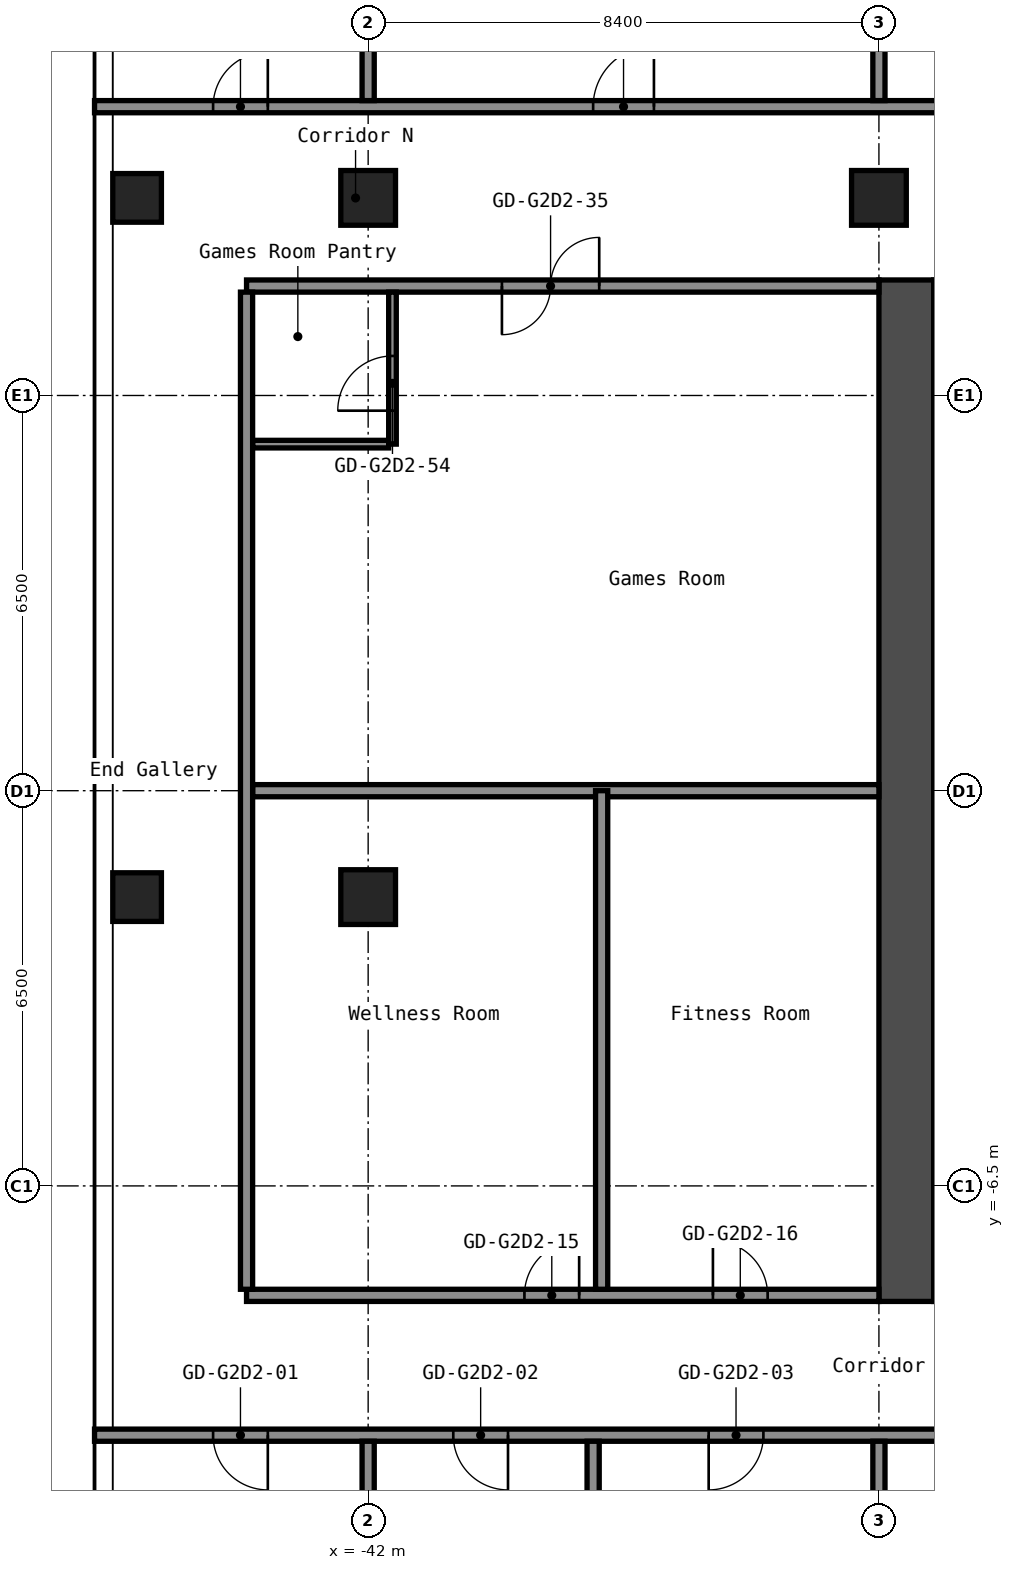
"""IFC4 building model, lengths in metres.
Left out: names, types, materials, properties, quantities, classifications, styles, units other than length and angle.
Written with IfcOpenShell. Run it as: python <this file> out.ifc"""

import sys

from ifc_helpers import new_model, si_unit, direction, frame, frame_2d, origin, origin_2d, place, context, subcontext, project, spatial, rectangle, hollow_rectangle, extrude, element, fill, save


model = new_model("IFC4")
c1 = context("Model", 3, precision=1e-05, world=origin(), true_north=direction((0.0, 1.0)))
c2 = subcontext(c1, "Body", "Model", "MODEL_VIEW")
j1 = project(units=[si_unit("LENGTHUNIT", "METRE"), si_unit("PLANEANGLEUNIT", "RADIAN")], contexts=[c1])
p1 = place(None, origin())
s1 = spatial("IfcSite", under=j1, at=p1, CompositionType="ELEMENT")
p2 = place(p1, origin())
s2 = spatial("IfcBuilding", under=s1, at=p2, CompositionType="ELEMENT")
p3 = place(p2, frame((0.0, 0.0, 117.0)))
s3 = spatial("IfcBuildingStorey", under=s2, at=p3, CompositionType="ELEMENT", Elevation=117.0)
for number, where, z_axis, x_axis in (
    (1, (-45.8, -1.75, 0.0), (0.0, 0.0, 1.0), (1.0, 0.0, 0.0)),
    (2, (-45.8, 9.75, 0.0), (0.0, 0.0, 1.0), (1.0, 0.0, 0.0)),
):
    element("IfcColumn", number, at=place(p3, frame(where, z_axis=z_axis, x_axis=x_axis)), inside=s3, PredefinedType="COLUMN", context=c2, shape_type="SweptSolid", body=[
        extrude(hollow_rectangle(XDim=0.8, YDim=0.8, WallThickness=0.032, at=origin_2d()), origin(), (0.0, 0.0, 1.0), 2.9),
    ])
for number, where, z_axis, x_axis in (
    (3, (-42.0, -1.75, 0.0), (0.0, 0.0, 1.0), (1.0, 0.0, 0.0)),
    (4, (-42.0, 9.75, 0.0), (0.0, 0.0, 1.0), (1.0, 0.0, 0.0)),
    (5, (-33.6, 9.75, 0.0), (0.0, 0.0, 1.0), (1.0, 0.0, 0.0)),
):
    element("IfcColumn", number, at=place(p3, frame(where, z_axis=z_axis, x_axis=x_axis)), inside=s3, PredefinedType="COLUMN", context=c2, shape_type="SweptSolid", body=[
        extrude(hollow_rectangle(XDim=0.9, YDim=0.9, WallThickness=0.036, at=origin_2d()), origin(), (0.0, 0.0, 1.0), 2.9),
    ])
p4 = place(p3, frame((-33.15, -8.4, 0.0), z_axis=(0.0, 0.0, 1.0), x_axis=(0.0, 1.0, 0.0)))
e6 = element("IfcWall", 6, at=p4, inside=s3, PredefinedType="SHEAR", context=c2, shape_type="SweptSolid", body=[
    extrude(rectangle(XDim=16.8, YDim=0.9, at=frame_2d((8.4, 0.0))), origin(), (0.0, 0.0, 1.0), 2.9),
])
p5 = place(p3, frame((-32.7, 7.95, 0.0), z_axis=(0.0, 0.0, 1.0), x_axis=(1.0, 0.0, 0.0)))
e7 = element("IfcWall", 7, at=p5, inside=s3, PredefinedType="SHEAR", context=c2, shape_type="SweptSolid", body=[
    extrude(rectangle(XDim=15.0, YDim=0.9, at=frame_2d((7.5, 0.0))), origin(), (0.0, 0.0, 1.0), 2.9),
])
p6 = place(p5, frame((3.4, 0.0, 0.0)))
e8 = element("IfcOpeningElement", 8, at=p6, cuts=e7, PredefinedType="OPENING", context=c2, shape_type="SweptSolid", body=[
    extrude(rectangle(XDim=1.2, YDim=2.1, at=frame_2d((0.6, 1.05))), frame((0.0, 0.46, 0.0), z_axis=(0.0, -1.0, 0.0), x_axis=(1.0, 0.0, 0.0)), (0.0, 0.0, 1.0), 0.92),
])
p7 = place(p5, frame((0.75, 0.0, 0.0)))
e9 = element("IfcOpeningElement", 9, at=p7, cuts=e7, PredefinedType="OPENING", context=c2, shape_type="SweptSolid", body=[
    extrude(rectangle(XDim=0.9, YDim=2.1, at=frame_2d((0.45, 1.05))), frame((0.0, 0.46, 0.0), z_axis=(0.0, -1.0, 0.0), x_axis=(1.0, 0.0, 0.0)), (0.0, 0.0, 1.0), 0.92),
])
p8 = place(p3, frame((-32.7, -7.95, 0.0), z_axis=(0.0, 0.0, 1.0), x_axis=(1.0, 0.0, 0.0)))
e10 = element("IfcWall", 10, at=p8, inside=s3, PredefinedType="SHEAR", context=c2, shape_type="SweptSolid", body=[
    extrude(rectangle(XDim=15.0, YDim=0.9, at=frame_2d((7.5, 0.0))), origin(), (0.0, 0.0, 1.0), 2.9),
])
p9 = place(p8, frame((11.45, 0.0, 0.0)))
e11 = element("IfcOpeningElement", 11, at=p9, cuts=e10, PredefinedType="OPENING", context=c2, shape_type="SweptSolid", body=[
    extrude(rectangle(XDim=1.0, YDim=2.1, at=frame_2d((0.5, 1.05))), frame((0.0, 0.46, 0.0), z_axis=(0.0, -1.0, 0.0), x_axis=(1.0, 0.0, 0.0)), (0.0, 0.0, 1.0), 0.92),
])
p10 = place(p3, frame((-32.7, 1.325, 0.0), z_axis=(0.0, 0.0, 1.0), x_axis=(1.0, 0.0, 0.0)))
e12 = element("IfcWall", 12, at=p10, inside=s3, PredefinedType="SHEAR", context=c2, shape_type="SweptSolid", body=[
    extrude(rectangle(XDim=5.05, YDim=0.25, at=frame_2d((2.525, 0.0))), origin(), (0.0, 0.0, 1.0), 2.9),
])
p11 = place(p10, frame((3.3, 0.0, 0.0)))
e13 = element("IfcOpeningElement", 13, at=p11, cuts=e12, PredefinedType="OPENING", context=c2, shape_type="SweptSolid", body=[
    extrude(rectangle(XDim=1.2, YDim=2.1, at=frame_2d((0.6, 1.05))), frame((0.0, 0.135, 0.0), z_axis=(0.0, -1.0, 0.0), x_axis=(1.0, 0.0, 0.0)), (0.0, 0.0, 1.0), 0.27),
])
p12 = place(p3, frame((-32.7, 2.375, 0.0), z_axis=(0.0, 0.0, 1.0), x_axis=(1.0, 0.0, 0.0)))
e14 = element("IfcWall", 14, at=p12, inside=s3, PredefinedType="SHEAR", context=c2, shape_type="SweptSolid", body=[
    extrude(rectangle(XDim=2.4, YDim=1.85, at=frame_2d((1.2, 0.0))), origin(), (0.0, 0.0, 1.0), 2.9),
])
p13 = place(p3, frame((-32.7, 6.075, 0.0), z_axis=(0.0, 0.0, 1.0), x_axis=(1.0, 0.0, 0.0)))
e15 = element("IfcWall", 15, at=p13, inside=s3, PredefinedType="SHEAR", context=c2, shape_type="SweptSolid", body=[
    extrude(rectangle(XDim=2.4, YDim=0.25, at=frame_2d((1.2, 0.0))), origin(), (0.0, 0.0, 1.0), 2.9),
])
p14 = place(p3, frame((-32.7, -3.625, 0.0), z_axis=(0.0, 0.0, 1.0), x_axis=(1.0, 0.0, 0.0)))
e16 = element("IfcWall", 16, at=p14, inside=s3, PredefinedType="SHEAR", context=c2, shape_type="SweptSolid", body=[
    extrude(rectangle(XDim=4.55, YDim=0.25, at=frame_2d((2.275, 0.0))), origin(), (0.0, 0.0, 1.0), 2.9),
])
p15 = place(p14, frame((2.85, 0.0, 0.0)))
e17 = element("IfcOpeningElement", 17, at=p15, cuts=e16, PredefinedType="OPENING", context=c2, shape_type="SweptSolid", body=[
    extrude(rectangle(XDim=1.1, YDim=2.1, at=frame_2d((0.55, 1.05))), frame((0.0, 0.135, 0.0), z_axis=(0.0, -1.0, 0.0), x_axis=(1.0, 0.0, 0.0)), (0.0, 0.0, 1.0), 0.27),
])
p16 = place(p14, frame((0.6, 0.0, 0.0)))
e18 = element("IfcOpeningElement", 18, at=p16, cuts=e16, PredefinedType="OPENING", context=c2, shape_type="SweptSolid", body=[
    extrude(rectangle(XDim=1.1, YDim=2.1, at=frame_2d((0.55, 1.05))), frame((0.0, 0.135, 0.0), z_axis=(0.0, -1.0, 0.0), x_axis=(1.0, 0.0, 0.0)), (0.0, 0.0, 1.0), 0.27),
])
p17 = place(p3, frame((-32.7, -6.75, 0.0), z_axis=(0.0, 0.0, 1.0), x_axis=(1.0, 0.0, 0.0)))
e19 = element("IfcWall", 19, at=p17, inside=s3, PredefinedType="SHEAR", context=c2, shape_type="SweptSolid", body=[
    extrude(rectangle(XDim=4.55, YDim=1.5, at=frame_2d((2.275, 0.0))), origin(), (0.0, 0.0, 1.0), 2.9),
])
p18 = place(p3, frame((-32.7, -0.875, 0.0), z_axis=(0.0, 0.0, 1.0), x_axis=(1.0, 0.0, 0.0)))
e20 = element("IfcWall", 20, at=p18, inside=s3, PredefinedType="PARTITIONING", context=c2, shape_type="SweptSolid", body=[
    extrude(rectangle(XDim=2.3, YDim=0.15, at=frame_2d((1.15, 0.0))), origin(), (0.0, 0.0, 1.0), 2.9),
])
p19 = place(p3, frame((-46.5, -10.6, 0.0), z_axis=(0.0, 0.0, 1.0), x_axis=(1.0, 0.0, 0.0)))
e21 = element("IfcWall", 21, at=p19, inside=s3, PredefinedType="PARTITIONING", context=c2, shape_type="SweptSolid", body=[
    extrude(rectangle(XDim=29.7, YDim=0.2, at=frame_2d((14.85, 0.0))), origin(), (0.0, 0.0, 1.0), 2.9),
])
p20 = place(p19, frame((1.95, 0.0, 0.0)))
e22 = element("IfcOpeningElement", 22, at=p20, cuts=e21, PredefinedType="OPENING", context=c2, shape_type="SweptSolid", body=[
    extrude(rectangle(XDim=0.9, YDim=2.1, at=frame_2d((0.45, 1.05))), frame((0.0, 0.11, 0.0), z_axis=(0.0, -1.0, 0.0), x_axis=(1.0, 0.0, 0.0)), (0.0, 0.0, 1.0), 0.22),
])
p21 = place(p19, frame((5.9, 0.0, 0.0)))
e23 = element("IfcOpeningElement", 23, at=p21, cuts=e21, PredefinedType="OPENING", context=c2, shape_type="SweptSolid", body=[
    extrude(rectangle(XDim=0.9, YDim=2.1, at=frame_2d((0.45, 1.05))), frame((0.0, 0.11, 0.0), z_axis=(0.0, -1.0, 0.0), x_axis=(1.0, 0.0, 0.0)), (0.0, 0.0, 1.0), 0.22),
])
p22 = place(p19, frame((10.1, 0.0, 0.0)))
e24 = element("IfcOpeningElement", 24, at=p22, cuts=e21, PredefinedType="OPENING", context=c2, shape_type="SweptSolid", body=[
    extrude(rectangle(XDim=0.9, YDim=2.1, at=frame_2d((0.45, 1.05))), frame((0.0, 0.11, 0.0), z_axis=(0.0, -1.0, 0.0), x_axis=(1.0, 0.0, 0.0)), (0.0, 0.0, 1.0), 0.22),
])
p23 = place(p19, frame((14.885, 0.0, 0.0)))
e25 = element("IfcOpeningElement", 25, at=p23, cuts=e21, PredefinedType="OPENING", context=c2, shape_type="SweptSolid", body=[
    extrude(rectangle(XDim=0.9, YDim=2.1, at=frame_2d((0.45, 1.05))), frame((0.0, 0.11, 0.0), z_axis=(0.0, -1.0, 0.0), x_axis=(1.0, 0.0, 0.0)), (0.0, 0.0, 1.0), 0.22),
])
p24 = place(p19, frame((19.085, 0.0, 0.0)))
e26 = element("IfcOpeningElement", 26, at=p24, cuts=e21, PredefinedType="OPENING", context=c2, shape_type="SweptSolid", body=[
    extrude(rectangle(XDim=0.9, YDim=2.1, at=frame_2d((0.45, 1.05))), frame((0.0, 0.11, 0.0), z_axis=(0.0, -1.0, 0.0), x_axis=(1.0, 0.0, 0.0)), (0.0, 0.0, 1.0), 0.22),
])
p25 = place(p19, frame((22.36, 0.0, 0.0)))
e27 = element("IfcOpeningElement", 27, at=p25, cuts=e21, PredefinedType="OPENING", context=c2, shape_type="SweptSolid", body=[
    extrude(rectangle(XDim=0.9, YDim=2.1, at=frame_2d((0.45, 1.05))), frame((0.0, 0.11, 0.0), z_axis=(0.0, -1.0, 0.0), x_axis=(1.0, 0.0, 0.0)), (0.0, 0.0, 1.0), 0.22),
])
p26 = place(p19, frame((26.56, 0.0, 0.0)))
e28 = element("IfcOpeningElement", 28, at=p26, cuts=e21, PredefinedType="OPENING", context=c2, shape_type="SweptSolid", body=[
    extrude(rectangle(XDim=0.9, YDim=2.1, at=frame_2d((0.45, 1.05))), frame((0.0, 0.11, 0.0), z_axis=(0.0, -1.0, 0.0), x_axis=(1.0, 0.0, 0.0)), (0.0, 0.0, 1.0), 0.22),
])
p27 = place(p3, frame((-44.0, -8.3, 0.0), z_axis=(0.0, 0.0, 1.0), x_axis=(1.0, 0.0, 0.0)))
e29 = element("IfcWall", 29, at=p27, inside=s3, PredefinedType="PARTITIONING", context=c2, shape_type="SweptSolid", body=[
    extrude(rectangle(XDim=10.4, YDim=0.2, at=frame_2d((5.2, 0.0))), origin(), (0.0, 0.0, 1.0), 2.9),
])
p28 = place(p27, frame((4.57, 0.0, 0.0)))
e30 = element("IfcOpeningElement", 30, at=p28, cuts=e29, PredefinedType="OPENING", context=c2, shape_type="SweptSolid", body=[
    extrude(rectangle(XDim=0.9, YDim=2.1, at=frame_2d((0.45, 1.05))), frame((0.0, 0.11, 0.0), z_axis=(0.0, -1.0, 0.0), x_axis=(1.0, 0.0, 0.0)), (0.0, 0.0, 1.0), 0.22),
])
p29 = place(p27, frame((7.67, 0.0, 0.0)))
e31 = element("IfcOpeningElement", 31, at=p29, cuts=e29, PredefinedType="OPENING", context=c2, shape_type="SweptSolid", body=[
    extrude(rectangle(XDim=0.9, YDim=2.1, at=frame_2d((0.45, 1.05))), frame((0.0, 0.11, 0.0), z_axis=(0.0, -1.0, 0.0), x_axis=(1.0, 0.0, 0.0)), (0.0, 0.0, 1.0), 0.22),
])
p30 = place(p3, frame((-43.9, 0.0, 0.0), z_axis=(0.0, 0.0, 1.0), x_axis=(1.0, 0.0, 0.0)))
e32 = element("IfcWall", 32, at=p30, inside=s3, PredefinedType="PARTITIONING", context=c2, shape_type="SweptSolid", body=[
    extrude(rectangle(XDim=10.3, YDim=0.2, at=frame_2d((5.15, 0.0))), origin(), (0.0, 0.0, 1.0), 2.9),
])
p31 = place(p3, frame((-43.9, 5.7, 0.0), z_axis=(0.0, 0.0, 1.0), x_axis=(1.0, 0.0, 0.0)))
e33 = element("IfcWall", 33, at=p31, inside=s3, PredefinedType="PARTITIONING", context=c2, shape_type="SweptSolid", body=[
    extrude(rectangle(XDim=2.237, YDim=0.125, at=frame_2d((1.119, 0.0))), origin(), (0.0, 0.0, 1.0), 2.9),
])
p32 = place(p3, frame((-44.0, 8.3, 0.0), z_axis=(0.0, 0.0, 1.0), x_axis=(1.0, 0.0, 0.0)))
e34 = element("IfcWall", 34, at=p32, inside=s3, PredefinedType="PARTITIONING", context=c2, shape_type="SweptSolid", body=[
    extrude(rectangle(XDim=10.4, YDim=0.2, at=frame_2d((5.2, 0.0))), origin(), (0.0, 0.0, 1.0), 2.9),
])
p33 = place(p32, frame((4.2, 0.0, 0.0)))
e35 = element("IfcOpeningElement", 35, at=p33, cuts=e34, PredefinedType="OPENING", context=c2, shape_type="SweptSolid", body=[
    extrude(rectangle(XDim=1.6, YDim=2.1, at=frame_2d((0.8, 1.05))), frame((0.0, 0.11, 0.0), z_axis=(0.0, -1.0, 0.0), x_axis=(1.0, 0.0, 0.0)), (0.0, 0.0, 1.0), 0.22),
])
p34 = place(p3, frame((-46.5, 11.25, 0.0), z_axis=(0.0, 0.0, 1.0), x_axis=(1.0, 0.0, 0.0)))
e36 = element("IfcWall", 36, at=p34, inside=s3, PredefinedType="PARTITIONING", context=c2, shape_type="SweptSolid", body=[
    extrude(rectangle(XDim=29.7, YDim=0.2, at=frame_2d((14.85, 0.0))), origin(), (0.0, 0.0, 1.0), 2.9),
])
p35 = place(p34, frame((1.95, 0.0, 0.0)))
e37 = element("IfcOpeningElement", 37, at=p35, cuts=e36, PredefinedType="OPENING", context=c2, shape_type="SweptSolid", body=[
    extrude(rectangle(XDim=0.9, YDim=2.1, at=frame_2d((0.45, 1.05))), frame((0.0, 0.11, 0.0), z_axis=(0.0, -1.0, 0.0), x_axis=(1.0, 0.0, 0.0)), (0.0, 0.0, 1.0), 0.22),
])
p36 = place(p34, frame((8.2, 0.0, 0.0)))
e38 = element("IfcOpeningElement", 38, at=p36, cuts=e36, PredefinedType="OPENING", context=c2, shape_type="SweptSolid", body=[
    extrude(rectangle(XDim=1.0, YDim=2.1, at=frame_2d((0.5, 1.05))), frame((0.0, 0.11, 0.0), z_axis=(0.0, -1.0, 0.0), x_axis=(1.0, 0.0, 0.0)), (0.0, 0.0, 1.0), 0.22),
])
p37 = place(p34, frame((16.6, 0.0, 0.0)))
e39 = element("IfcOpeningElement", 39, at=p37, cuts=e36, PredefinedType="OPENING", context=c2, shape_type="SweptSolid", body=[
    extrude(rectangle(XDim=1.0, YDim=2.1, at=frame_2d((0.5, 1.05))), frame((0.0, 0.11, 0.0), z_axis=(0.0, -1.0, 0.0), x_axis=(1.0, 0.0, 0.0)), (0.0, 0.0, 1.0), 0.22),
])
p38 = place(p34, frame((23.54, 0.0, 0.0)))
e40 = element("IfcOpeningElement", 40, at=p38, cuts=e36, PredefinedType="OPENING", context=c2, shape_type="SweptSolid", body=[
    extrude(rectangle(XDim=0.9, YDim=2.1, at=frame_2d((0.45, 1.05))), frame((0.0, 0.11, 0.0), z_axis=(0.0, -1.0, 0.0), x_axis=(1.0, 0.0, 0.0)), (0.0, 0.0, 1.0), 0.22),
])
p39 = place(p34, frame((27.74, 0.0, 0.0)))
e41 = element("IfcOpeningElement", 41, at=p39, cuts=e36, PredefinedType="OPENING", context=c2, shape_type="SweptSolid", body=[
    extrude(rectangle(XDim=0.9, YDim=2.1, at=frame_2d((0.45, 1.05))), frame((0.0, 0.11, 0.0), z_axis=(0.0, -1.0, 0.0), x_axis=(1.0, 0.0, 0.0)), (0.0, 0.0, 1.0), 0.22),
])
p40 = place(p3, frame((-44.0, -8.2, 0.0), z_axis=(0.0, 0.0, 1.0), x_axis=(0.0, 1.0, 0.0)))
e42 = element("IfcWall", 42, at=p40, inside=s3, PredefinedType="PARTITIONING", context=c2, shape_type="SweptSolid", body=[
    extrude(rectangle(XDim=16.4, YDim=0.2, at=frame_2d((8.2, 0.0))), origin(), (0.0, 0.0, 1.0), 2.9),
])
p41 = place(p3, frame((-42.0, -15.55, 0.0), z_axis=(0.0, 0.0, 1.0), x_axis=(0.0, 1.0, 0.0)))
e43 = element("IfcWall", 43, at=p41, inside=s3, PredefinedType="PARTITIONING", context=c2, shape_type="SweptSolid", body=[
    extrude(rectangle(XDim=4.85, YDim=0.2, at=frame_2d((2.425, 0.0))), origin(), (0.0, 0.0, 1.0), 2.9),
])
p42 = place(p3, frame((-42.0, 11.35, 0.0), z_axis=(0.0, 0.0, 1.0), x_axis=(0.0, 1.0, 0.0)))
e44 = element("IfcWall", 44, at=p42, inside=s3, PredefinedType="PARTITIONING", context=c2, shape_type="SweptSolid", body=[
    extrude(rectangle(XDim=12.2, YDim=0.2, at=frame_2d((6.1, 0.0))), origin(), (0.0, 0.0, 1.0), 2.9),
])
p43 = place(p3, frame((-41.6, 5.7, 0.0), z_axis=(0.0, 0.0, 1.0), x_axis=(0.0, 1.0, 0.0)))
e45 = element("IfcWall", 45, at=p43, inside=s3, PredefinedType="PARTITIONING", context=c2, shape_type="SweptSolid", body=[
    extrude(rectangle(XDim=2.5, YDim=0.125, at=frame_2d((1.25, 0.0))), origin(), (0.0, 0.0, 1.0), 2.9),
])
p44 = place(p43, frame((0.55, 0.0, 0.0)))
e46 = element("IfcOpeningElement", 46, at=p44, cuts=e45, PredefinedType="OPENING", context=c2, shape_type="SweptSolid", body=[
    extrude(rectangle(XDim=0.9, YDim=2.1, at=frame_2d((0.45, 1.05))), frame((0.0, 0.073, 0.0), z_axis=(0.0, -1.0, 0.0), x_axis=(1.0, 0.0, 0.0)), (0.0, 0.0, 1.0), 0.145),
])
p45 = place(p3, frame((-38.3, -15.55, 0.0), z_axis=(0.0, 0.0, 1.0), x_axis=(0.0, 1.0, 0.0)))
e47 = element("IfcWall", 47, at=p45, inside=s3, PredefinedType="PARTITIONING", context=c2, shape_type="SweptSolid", body=[
    extrude(rectangle(XDim=4.85, YDim=0.2, at=frame_2d((2.425, 0.0))), origin(), (0.0, 0.0, 1.0), 2.9),
])
p46 = place(p3, frame((-38.16, -8.2, 0.0), z_axis=(0.0, 0.0, 1.0), x_axis=(0.0, 1.0, 0.0)))
e48 = element("IfcWall", 48, at=p46, inside=s3, PredefinedType="PARTITIONING", context=c2, shape_type="SweptSolid", body=[
    extrude(rectangle(XDim=8.2, YDim=0.2, at=frame_2d((4.1, 0.0))), origin(), (0.0, 0.0, 1.0), 2.9),
])
p47 = place(p3, frame((-33.6, -15.55, 0.0), z_axis=(0.0, 0.0, 1.0), x_axis=(0.0, 1.0, 0.0)))
e49 = element("IfcWall", 49, at=p47, inside=s3, PredefinedType="PARTITIONING", context=c2, shape_type="SweptSolid", body=[
    extrude(rectangle(XDim=4.85, YDim=0.2, at=frame_2d((2.425, 0.0))), origin(), (0.0, 0.0, 1.0), 2.9),
])
p48 = place(p3, frame((-33.6, 11.35, 0.0), z_axis=(0.0, 0.0, 1.0), x_axis=(0.0, 1.0, 0.0)))
e50 = element("IfcWall", 50, at=p48, inside=s3, PredefinedType="PARTITIONING", context=c2, shape_type="SweptSolid", body=[
    extrude(rectangle(XDim=12.2, YDim=0.2, at=frame_2d((6.1, 0.0))), origin(), (0.0, 0.0, 1.0), 2.9),
])
p49 = place(p20, origin())
e51 = element("IfcDoor", 51, at=p49, inside=s3, OperationType="SINGLE_SWING_RIGHT", PredefinedType="DOOR", context=c2, shape_type="SweptSolid", body=[
    extrude(rectangle(XDim=0.9, YDim=2.1, at=frame_2d((0.45, 1.05))), frame((0.0, 0.025, 0.0), z_axis=(0.0, -1.0, 0.0), x_axis=(1.0, 0.0, 0.0)), (0.0, 0.0, 1.0), 0.05),
])
fill(e22, e51)
p50 = place(p21, origin())
e52 = element("IfcDoor", 52, at=p50, inside=s3, OperationType="SINGLE_SWING_RIGHT", PredefinedType="DOOR", context=c2, shape_type="SweptSolid", body=[
    extrude(rectangle(XDim=0.9, YDim=2.1, at=frame_2d((0.45, 1.05))), frame((0.0, 0.025, 0.0), z_axis=(0.0, -1.0, 0.0), x_axis=(1.0, 0.0, 0.0)), (0.0, 0.0, 1.0), 0.05),
])
fill(e23, e52)
p51 = place(p22, origin())
e53 = element("IfcDoor", 53, at=p51, inside=s3, OperationType="SINGLE_SWING_LEFT", PredefinedType="DOOR", context=c2, shape_type="SweptSolid", body=[
    extrude(rectangle(XDim=0.9, YDim=2.1, at=frame_2d((0.45, 1.05))), frame((0.0, 0.025, 0.0), z_axis=(0.0, -1.0, 0.0), x_axis=(1.0, 0.0, 0.0)), (0.0, 0.0, 1.0), 0.05),
])
fill(e24, e53)
p52 = place(p28, origin())
e54 = element("IfcDoor", 54, at=p52, inside=s3, OperationType="SINGLE_SWING_LEFT", PredefinedType="DOOR", context=c2, shape_type="SweptSolid", body=[
    extrude(rectangle(XDim=0.9, YDim=2.1, at=frame_2d((0.45, 1.05))), frame((0.0, 0.025, 0.0), z_axis=(0.0, -1.0, 0.0), x_axis=(1.0, 0.0, 0.0)), (0.0, 0.0, 1.0), 0.05),
])
fill(e30, e54)
p53 = place(p29, origin())
e55 = element("IfcDoor", 55, at=p53, inside=s3, OperationType="SINGLE_SWING_RIGHT", PredefinedType="DOOR", context=c2, shape_type="SweptSolid", body=[
    extrude(rectangle(XDim=0.9, YDim=2.1, at=frame_2d((0.45, 1.05))), frame((0.0, 0.025, 0.0), z_axis=(0.0, -1.0, 0.0), x_axis=(1.0, 0.0, 0.0)), (0.0, 0.0, 1.0), 0.05),
])
fill(e31, e55)
p54 = place(p33, origin())
e56 = element("IfcDoor", 56, at=p54, inside=s3, OperationType="DOUBLE_DOOR_SINGLE_SWING", PredefinedType="DOOR", context=c2, shape_type="SweptSolid", body=[
    extrude(rectangle(XDim=1.6, YDim=2.1, at=frame_2d((0.8, 1.05))), frame((0.0, 0.025, 0.0), z_axis=(0.0, -1.0, 0.0), x_axis=(1.0, 0.0, 0.0)), (0.0, 0.0, 1.0), 0.05),
])
fill(e35, e56)
p55 = place(p35, origin())
e57 = element("IfcDoor", 57, at=p55, inside=s3, OperationType="SINGLE_SWING_LEFT", PredefinedType="DOOR", context=c2, shape_type="SweptSolid", body=[
    extrude(rectangle(XDim=0.9, YDim=2.1, at=frame_2d((0.45, 1.05))), frame((0.0, 0.025, 0.0), z_axis=(0.0, -1.0, 0.0), x_axis=(1.0, 0.0, 0.0)), (0.0, 0.0, 1.0), 0.05),
])
fill(e37, e57)
p56 = place(p36, origin())
e58 = element("IfcDoor", 58, at=p56, inside=s3, OperationType="SINGLE_SWING_LEFT", PredefinedType="DOOR", context=c2, shape_type="SweptSolid", body=[
    extrude(rectangle(XDim=1.0, YDim=2.1, at=frame_2d((0.5, 1.05))), frame((0.0, 0.025, 0.0), z_axis=(0.0, -1.0, 0.0), x_axis=(1.0, 0.0, 0.0)), (0.0, 0.0, 1.0), 0.05),
])
fill(e38, e58)
p57 = place(p44, origin())
e59 = element("IfcDoor", 59, at=p57, inside=s3, OperationType="SINGLE_SWING_RIGHT", PredefinedType="DOOR", context=c2, shape_type="SweptSolid", body=[
    extrude(rectangle(XDim=0.9, YDim=2.1, at=frame_2d((0.45, 1.05))), frame((0.0, 0.025, 0.0), z_axis=(0.0, -1.0, 0.0), x_axis=(1.0, 0.0, 0.0)), (0.0, 0.0, 1.0), 0.05),
])
fill(e46, e59)
save(model, sys.argv[1])
